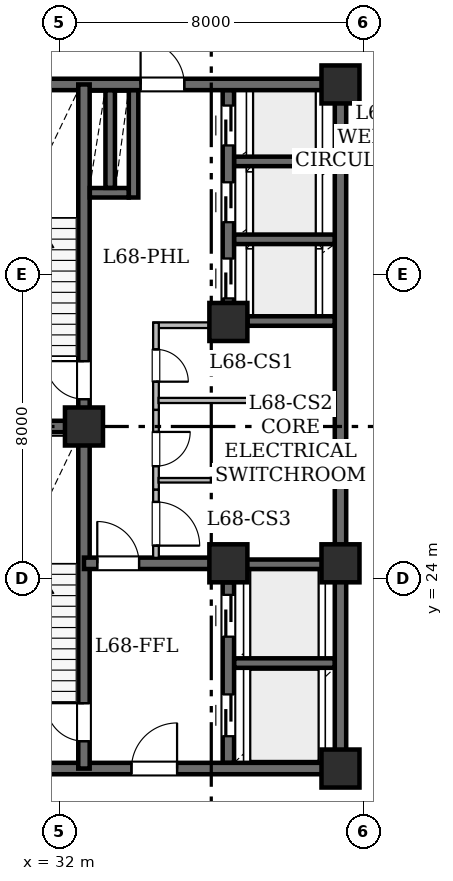
"""IFC4 building model, lengths in metres.
Left out: names, types, materials, properties, quantities, classifications, styles, units other than length and angle.
Written with IfcOpenShell. Run it as: python <this file> out.ifc"""

import sys

from ifc_helpers import new_model, si_unit, direction, frame, frame_2d, origin, origin_2d, place, context, subcontext, project, spatial, rectangle, hollow_rectangle, extrude, element, fill, save


model = new_model("IFC4")
c1 = context("Model", 3, precision=1e-05, world=origin(), true_north=direction((0.0, 1.0)))
c2 = subcontext(c1, "Body", "Model", "MODEL_VIEW")
j1 = project(units=[si_unit("LENGTHUNIT", "METRE"), si_unit("PLANEANGLEUNIT", "RADIAN")], contexts=[c1])
p1 = place(None, origin())
s1 = spatial("IfcSite", under=j1, at=p1, CompositionType="ELEMENT")
p2 = place(p1, origin())
s2 = spatial("IfcBuilding", under=s1, at=p2, CompositionType="ELEMENT")
p3 = place(p2, frame((0.0, 0.0, 264.65)))
s3 = spatial("IfcBuildingStorey", under=s2, at=p3, CompositionType="ELEMENT", Elevation=264.65)
for number, where, z_axis, x_axis in (
    (1, (32.65, 28.0, 0.0), (0.0, 0.0, 1.0), (1.0, 0.0, 0.0)),
    (2, (39.4, 19.0, 0.0), (0.0, 0.0, 1.0), (1.0, 0.0, 0.0)),
    (3, (36.45, 24.4, 0.0), (0.0, 0.0, 1.0), (1.0, 0.0, 0.0)),
    (4, (39.4, 24.4, 0.0), (0.0, 0.0, 1.0), (1.0, 0.0, 0.0)),
    (5, (36.45, 30.75, 0.0), (0.0, 0.0, 1.0), (1.0, 0.0, 0.0)),
    (6, (39.4, 37.0, 0.0), (0.0, 0.0, 1.0), (1.0, 0.0, 0.0)),
):
    element("IfcColumn", number, at=place(p3, frame(where, z_axis=z_axis, x_axis=x_axis)), inside=s3, PredefinedType="COLUMN", context=c2, shape_type="SweptSolid", body=[
        extrude(hollow_rectangle(XDim=1.0, YDim=1.0, WallThickness=0.05, at=origin_2d()), origin(), (0.0, 0.0, 1.0), 4.775),
    ])
p4 = place(p3, frame((29.0, 19.0, 0.0), z_axis=(0.0, 0.0, 1.0), x_axis=(1.0, 0.0, 0.0)))
e7 = element("IfcWall", 7, at=p4, inside=s3, PredefinedType="SHEAR", context=c2, shape_type="SweptSolid", body=[
    extrude(rectangle(XDim=10.4, YDim=0.3, at=frame_2d((5.2, 0.0))), origin(), (0.0, 0.0, 1.0), 4.38),
])
p5 = place(p4, frame((4.9, 0.0, 0.0)))
e8 = element("IfcOpeningElement", 8, at=p5, cuts=e7, PredefinedType="OPENING", context=c2, shape_type="SweptSolid", body=[
    extrude(rectangle(XDim=1.2, YDim=2.15, at=frame_2d((0.6, 1.075))), frame((0.0, 0.16, 0.0), z_axis=(0.0, -1.0, 0.0), x_axis=(1.0, 0.0, 0.0)), (0.0, 0.0, 1.0), 0.32),
])
p6 = place(p3, frame((29.0, 37.0, 0.0), z_axis=(0.0, 0.0, 1.0), x_axis=(1.0, 0.0, 0.0)))
e9 = element("IfcWall", 9, at=p6, inside=s3, PredefinedType="SHEAR", context=c2, shape_type="SweptSolid", body=[
    extrude(rectangle(XDim=10.4, YDim=0.3, at=frame_2d((5.2, 0.0))), origin(), (0.0, 0.0, 1.0), 4.38),
])
p7 = place(p6, frame((5.14, 0.0, 0.0)))
e10 = element("IfcOpeningElement", 10, at=p7, cuts=e9, PredefinedType="OPENING", context=c2, shape_type="SweptSolid", body=[
    extrude(rectangle(XDim=1.15, YDim=2.2, at=frame_2d((0.575, 1.1))), frame((0.0, 0.16, 0.0), z_axis=(0.0, -1.0, 0.0), x_axis=(1.0, 0.0, 0.0)), (0.0, 0.0, 1.0), 0.32),
])
p8 = place(p3, frame((39.4, 19.0, 0.0), z_axis=(0.0, 0.0, 1.0), x_axis=(0.0, 1.0, 0.0)))
e11 = element("IfcWall", 11, at=p8, inside=s3, PredefinedType="SHEAR", context=c2, shape_type="SweptSolid", body=[
    extrude(rectangle(XDim=5.4, YDim=0.3, at=frame_2d((2.7, 0.0))), origin(), (0.0, 0.0, 1.0), 4.38),
])
p9 = place(p3, frame((39.4, 24.4, 0.0), z_axis=(0.0, 0.0, 1.0), x_axis=(0.0, 1.0, 0.0)))
e12 = element("IfcWall", 12, at=p9, inside=s3, PredefinedType="SHEAR", context=c2, shape_type="SweptSolid", body=[
    extrude(rectangle(XDim=12.6, YDim=0.3, at=frame_2d((6.3, 0.0))), origin(), (0.0, 0.0, 1.0), 4.38),
])
p10 = place(p3, frame((32.65, 19.0, 0.0), z_axis=(0.0, 0.0, 1.0), x_axis=(0.0, 1.0, 0.0)))
e13 = element("IfcWall", 13, at=p10, inside=s3, PredefinedType="SHEAR", context=c2, shape_type="SweptSolid", body=[
    extrude(rectangle(XDim=9.0, YDim=0.3, at=frame_2d((4.5, 0.0))), origin(), (0.0, 0.0, 1.0), 4.38),
])
p11 = place(p10, frame((0.72, 0.0, 0.0)))
e14 = element("IfcOpeningElement", 14, at=p11, cuts=e13, PredefinedType="OPENING", context=c2, shape_type="SweptSolid", body=[
    extrude(rectangle(XDim=1.0, YDim=2.15, at=frame_2d((0.5, 1.075))), frame((0.0, 0.16, 0.0), z_axis=(0.0, -1.0, 0.0), x_axis=(1.0, 0.0, 0.0)), (0.0, 0.0, 1.0), 0.32),
])
p12 = place(p3, frame((32.65, 28.0, 0.0), z_axis=(0.0, 0.0, 1.0), x_axis=(0.0, 1.0, 0.0)))
e15 = element("IfcWall", 15, at=p12, inside=s3, PredefinedType="SHEAR", context=c2, shape_type="SweptSolid", body=[
    extrude(rectangle(XDim=9.0, YDim=0.3, at=frame_2d((4.5, 0.0))), origin(), (0.0, 0.0, 1.0), 4.38),
])
p13 = place(p12, frame((0.72, 0.0, 0.0)))
e16 = element("IfcOpeningElement", 16, at=p13, cuts=e15, PredefinedType="OPENING", context=c2, shape_type="SweptSolid", body=[
    extrude(rectangle(XDim=1.0, YDim=2.15, at=frame_2d((0.5, 1.075))), frame((0.0, 0.16, 0.0), z_axis=(0.0, -1.0, 0.0), x_axis=(1.0, 0.0, 0.0)), (0.0, 0.0, 1.0), 0.32),
])
p14 = place(p3, frame((29.0, 28.0, 0.0), z_axis=(0.0, 0.0, 1.0), x_axis=(1.0, 0.0, 0.0)))
e17 = element("IfcWall", 17, at=p14, inside=s3, PredefinedType="SHEAR", context=c2, shape_type="SweptSolid", body=[
    extrude(rectangle(XDim=3.65, YDim=0.3, at=frame_2d((1.825, 0.0))), origin(), (0.0, 0.0, 1.0), 4.38),
])
p15 = place(p3, frame((32.65, 24.4, 0.0), z_axis=(0.0, 0.0, 1.0), x_axis=(1.0, 0.0, 0.0)))
e18 = element("IfcWall", 18, at=p15, inside=s3, PredefinedType="SHEAR", context=c2, shape_type="SweptSolid", body=[
    extrude(rectangle(XDim=3.8, YDim=0.3, at=frame_2d((1.9, 0.0))), origin(), (0.0, 0.0, 1.0), 4.38),
])
p16 = place(p15, frame((0.35, 0.0, 0.0)))
e19 = element("IfcOpeningElement", 19, at=p16, cuts=e18, PredefinedType="OPENING", context=c2, shape_type="SweptSolid", body=[
    extrude(rectangle(XDim=1.1, YDim=2.15, at=frame_2d((0.55, 1.075))), frame((0.0, 0.16, 0.0), z_axis=(0.0, -1.0, 0.0), x_axis=(1.0, 0.0, 0.0)), (0.0, 0.0, 1.0), 0.32),
])
p17 = place(p3, frame((36.45, 19.154, 0.0), z_axis=(0.0, 0.0, 1.0), x_axis=(0.0, 1.0, 0.0)))
e20 = element("IfcWall", 20, at=p17, inside=s3, PredefinedType="SHEAR", context=c2, shape_type="SweptSolid", body=[
    extrude(rectangle(XDim=4.746, YDim=0.3, at=frame_2d((2.373, 0.0))), origin(), (0.0, 0.0, 1.0), 4.38),
])
p18 = place(p17, frame((0.696, 0.0, 0.0)))
e21 = element("IfcOpeningElement", 21, at=p18, cuts=e20, PredefinedType="OPENING", context=c2, shape_type="SweptSolid", body=[
    extrude(rectangle(XDim=1.1, YDim=2.15, at=frame_2d((0.55, 1.075))), frame((0.0, 0.16, 0.0), z_axis=(0.0, -1.0, 0.0), x_axis=(1.0, 0.0, 0.0)), (0.0, 0.0, 1.0), 0.32),
])
p19 = place(p17, frame((3.316, 0.0, 0.0)))
e22 = element("IfcOpeningElement", 22, at=p19, cuts=e20, PredefinedType="OPENING", context=c2, shape_type="SweptSolid", body=[
    extrude(rectangle(XDim=1.1, YDim=2.15, at=frame_2d((0.55, 1.075))), frame((0.0, 0.16, 0.0), z_axis=(0.0, -1.0, 0.0), x_axis=(1.0, 0.0, 0.0)), (0.0, 0.0, 1.0), 0.32),
])
p20 = place(p3, frame((36.45, 31.25, 0.0), z_axis=(0.0, 0.0, 1.0), x_axis=(0.0, 1.0, 0.0)))
e23 = element("IfcWall", 23, at=p20, inside=s3, PredefinedType="SHEAR", context=c2, shape_type="SweptSolid", body=[
    extrude(rectangle(XDim=5.596, YDim=0.3, at=frame_2d((2.798, 0.0))), origin(), (0.0, 0.0, 1.0), 4.38),
])
p21 = place(p20, frame((0.12, 0.0, 0.0)))
e24 = element("IfcOpeningElement", 24, at=p21, cuts=e23, PredefinedType="OPENING", context=c2, shape_type="SweptSolid", body=[
    extrude(rectangle(XDim=1.05, YDim=2.15, at=frame_2d((0.525, 1.075))), frame((0.0, 0.16, 0.0), z_axis=(0.0, -1.0, 0.0), x_axis=(1.0, 0.0, 0.0)), (0.0, 0.0, 1.0), 0.32),
])
p22 = place(p20, frame((2.125, 0.0, 0.0)))
e25 = element("IfcOpeningElement", 25, at=p22, cuts=e23, PredefinedType="OPENING", context=c2, shape_type="SweptSolid", body=[
    extrude(rectangle(XDim=1.05, YDim=2.15, at=frame_2d((0.525, 1.075))), frame((0.0, 0.16, 0.0), z_axis=(0.0, -1.0, 0.0), x_axis=(1.0, 0.0, 0.0)), (0.0, 0.0, 1.0), 0.32),
])
p23 = place(p20, frame((4.145, 0.0, 0.0)))
e26 = element("IfcOpeningElement", 26, at=p23, cuts=e23, PredefinedType="OPENING", context=c2, shape_type="SweptSolid", body=[
    extrude(rectangle(XDim=1.05, YDim=2.15, at=frame_2d((0.525, 1.075))), frame((0.0, 0.16, 0.0), z_axis=(0.0, -1.0, 0.0), x_axis=(1.0, 0.0, 0.0)), (0.0, 0.0, 1.0), 0.32),
])
for number, where, z_axis, x_axis in (
    (27, (36.604, 21.775, 0.0), (0.0, 0.0, 1.0), (1.0, 0.0, 0.0)),
    (28, (36.604, 24.375, 0.0), (0.0, 0.0, 1.0), (1.0, 0.0, 0.0)),
):
    element("IfcWall", number, at=place(p3, frame(where, z_axis=z_axis, x_axis=x_axis)), inside=s3, PredefinedType="SHEAR", context=c2, shape_type="SweptSolid", body=[
        extrude(rectangle(XDim=2.642, YDim=0.25, at=frame_2d((1.321, 0.0))), origin(), (0.0, 0.0, 1.0), 4.38),
    ])
p24 = place(p3, frame((36.954, 30.775, 0.0), z_axis=(0.0, 0.0, 1.0), x_axis=(1.0, 0.0, 0.0)))
e29 = element("IfcWall", 29, at=p24, inside=s3, PredefinedType="SHEAR", context=c2, shape_type="SweptSolid", body=[
    extrude(rectangle(XDim=2.292, YDim=0.25, at=frame_2d((1.146, 0.0))), origin(), (0.0, 0.0, 1.0), 4.38),
])
for number, where, z_axis, x_axis in (
    (30, (36.604, 32.925, 0.0), (0.0, 0.0, 1.0), (1.0, 0.0, 0.0)),
    (31, (36.604, 34.975, 0.0), (0.0, 0.0, 1.0), (1.0, 0.0, 0.0)),
):
    element("IfcWall", number, at=place(p3, frame(where, z_axis=z_axis, x_axis=x_axis)), inside=s3, PredefinedType="SHEAR", context=c2, shape_type="SweptSolid", body=[
        extrude(rectangle(XDim=2.642, YDim=0.25, at=frame_2d((1.321, 0.0))), origin(), (0.0, 0.0, 1.0), 4.38),
    ])
p25 = place(p3, frame((33.955, 34.025, 0.0), z_axis=(0.0, 0.0, 1.0), x_axis=(0.0, 1.0, 0.0)))
e32 = element("IfcWall", 32, at=p25, inside=s3, PredefinedType="SHEAR", context=c2, shape_type="SweptSolid", body=[
    extrude(rectangle(XDim=2.821, YDim=0.25, at=frame_2d((1.411, 0.0))), origin(), (0.0, 0.0, 1.0), 4.38),
])
p26 = place(p3, frame((32.804, 34.15, 0.0), z_axis=(0.0, 0.0, 1.0), x_axis=(1.0, 0.0, 0.0)))
e33 = element("IfcWall", 33, at=p26, inside=s3, PredefinedType="SHEAR", context=c2, shape_type="SweptSolid", body=[
    extrude(rectangle(XDim=1.022, YDim=0.25, at=frame_2d((0.511, 0.0))), origin(), (0.0, 0.0, 1.0), 4.38),
])
p27 = place(p3, frame((33.34, 34.279, 0.0), z_axis=(0.0, 0.0, 1.0), x_axis=(0.0, 1.0, 0.0)))
e34 = element("IfcWall", 34, at=p27, inside=s3, PredefinedType="SHEAR", context=c2, shape_type="SweptSolid", body=[
    extrude(rectangle(XDim=2.567, YDim=0.25, at=frame_2d((1.283, 0.0))), origin(), (0.0, 0.0, 1.0), 4.38),
])
p28 = place(p3, frame((36.3, 30.665, 0.0), z_axis=(0.0, 0.0, 1.0), x_axis=(-1.0, 0.0, 0.0)))
e35 = element("IfcWall", 35, at=p28, inside=s3, PredefinedType="STANDARD", context=c2, shape_type="SweptSolid", body=[
    extrude(rectangle(XDim=1.82, YDim=0.15, at=frame_2d((0.91, 0.0))), origin(), (0.0, 0.0, 1.0), 4.38),
])
p29 = place(p3, frame((34.545, 30.73, 0.0), z_axis=(0.0, 0.0, 1.0), x_axis=(0.0, -1.0, 0.0)))
e36 = element("IfcWall", 36, at=p29, inside=s3, PredefinedType="STANDARD", context=c2, shape_type="SweptSolid", body=[
    extrude(rectangle(XDim=2.294, YDim=0.15, at=frame_2d((1.147, 0.0))), origin(), (0.0, 0.0, 1.0), 4.38),
])
p30 = place(p29, frame((0.701, 0.0, 0.0)))
e37 = element("IfcOpeningElement", 37, at=p30, cuts=e36, PredefinedType="OPENING", context=c2, shape_type="SweptSolid", body=[
    extrude(rectangle(XDim=0.85, YDim=2.1, at=frame_2d((0.425, 1.05))), frame((0.0, 0.085, 0.0), z_axis=(0.0, -1.0, 0.0), x_axis=(1.0, 0.0, 0.0)), (0.0, 0.0, 1.0), 0.17),
])
p31 = place(p3, frame((34.545, 28.436, 0.0), z_axis=(0.0, 0.0, 1.0), x_axis=(0.0, -1.0, 0.0)))
e38 = element("IfcWall", 38, at=p31, inside=s3, PredefinedType="STANDARD", context=c2, shape_type="SweptSolid", body=[
    extrude(rectangle(XDim=2.1, YDim=0.15, at=frame_2d((1.05, 0.0))), origin(), (0.0, 0.0, 1.0), 4.38),
])
p32 = place(p31, frame((0.579, 0.0, 0.0)))
e39 = element("IfcOpeningElement", 39, at=p32, cuts=e38, PredefinedType="OPENING", context=c2, shape_type="SweptSolid", body=[
    extrude(rectangle(XDim=0.9, YDim=2.1, at=frame_2d((0.45, 1.05))), frame((0.0, 0.085, 0.0), z_axis=(0.0, -1.0, 0.0), x_axis=(1.0, 0.0, 0.0)), (0.0, 0.0, 1.0), 0.17),
])
p33 = place(p3, frame((34.545, 26.336, 0.0), z_axis=(0.0, 0.0, 1.0), x_axis=(0.0, -1.0, 0.0)))
e40 = element("IfcWall", 40, at=p33, inside=s3, PredefinedType="STANDARD", context=c2, shape_type="SweptSolid", body=[
    extrude(rectangle(XDim=1.792, YDim=0.15, at=frame_2d((0.896, 0.0))), origin(), (0.0, 0.0, 1.0), 4.38),
])
p34 = place(p33, frame((0.321, 0.0, 0.0)))
e41 = element("IfcOpeningElement", 41, at=p34, cuts=e40, PredefinedType="OPENING", context=c2, shape_type="SweptSolid", body=[
    extrude(rectangle(XDim=1.15, YDim=2.2, at=frame_2d((0.575, 1.1))), frame((0.0, 0.085, 0.0), z_axis=(0.0, -1.0, 0.0), x_axis=(1.0, 0.0, 0.0)), (0.0, 0.0, 1.0), 0.17),
])
p35 = place(p3, frame((39.256, 28.685, 0.0), z_axis=(0.0, 0.0, 1.0), x_axis=(-1.0, 0.0, 0.0)))
e42 = element("IfcWall", 42, at=p35, inside=s3, PredefinedType="PARTITIONING", context=c2, shape_type="SweptSolid", body=[
    extrude(rectangle(XDim=4.644, YDim=0.135, at=frame_2d((2.322, 0.0))), origin(), (0.0, 0.0, 1.0), 4.38),
])
p36 = place(p3, frame((39.256, 26.585, 0.0), z_axis=(0.0, 0.0, 1.0), x_axis=(-1.0, 0.0, 0.0)))
e43 = element("IfcWall", 43, at=p36, inside=s3, PredefinedType="PARTITIONING", context=c2, shape_type="SweptSolid", body=[
    extrude(rectangle(XDim=4.644, YDim=0.12, at=frame_2d((2.322, 0.0))), origin(), (0.0, 0.0, 1.0), 4.38),
])
p37 = place(p11, origin())
e44 = element("IfcDoor", 44, at=p37, inside=s3, OperationType="SINGLE_SWING_RIGHT", PredefinedType="DOOR", context=c2, shape_type="SweptSolid", body=[
    extrude(rectangle(XDim=1.0, YDim=2.15, at=frame_2d((0.5, 1.075))), frame((0.0, 0.025, 0.0), z_axis=(0.0, -1.0, 0.0), x_axis=(1.0, 0.0, 0.0)), (0.0, 0.0, 1.0), 0.05),
])
fill(e14, e44)
p38 = place(p13, origin())
e45 = element("IfcDoor", 45, at=p38, inside=s3, OperationType="SINGLE_SWING_RIGHT", PredefinedType="DOOR", context=c2, shape_type="SweptSolid", body=[
    extrude(rectangle(XDim=1.0, YDim=2.15, at=frame_2d((0.5, 1.075))), frame((0.0, 0.025, 0.0), z_axis=(0.0, -1.0, 0.0), x_axis=(1.0, 0.0, 0.0)), (0.0, 0.0, 1.0), 0.05),
])
fill(e16, e45)
p39 = place(p16, origin())
e46 = element("IfcDoor", 46, at=p39, inside=s3, OperationType="SINGLE_SWING_LEFT", PredefinedType="DOOR", context=c2, shape_type="SweptSolid", body=[
    extrude(rectangle(XDim=1.1, YDim=2.15, at=frame_2d((0.55, 1.075))), frame((0.0, 0.025, 0.0), z_axis=(0.0, -1.0, 0.0), x_axis=(1.0, 0.0, 0.0)), (0.0, 0.0, 1.0), 0.05),
])
fill(e19, e46)
p40 = place(p5, origin())
e47 = element("IfcDoor", 47, at=p40, inside=s3, OperationType="SINGLE_SWING_RIGHT", PredefinedType="DOOR", context=c2, shape_type="SweptSolid", body=[
    extrude(rectangle(XDim=1.2, YDim=2.15, at=frame_2d((0.6, 1.075))), frame((0.0, 0.025, 0.0), z_axis=(0.0, -1.0, 0.0), x_axis=(1.0, 0.0, 0.0)), (0.0, 0.0, 1.0), 0.05),
])
fill(e8, e47)
p41 = place(p7, origin())
e48 = element("IfcDoor", 48, at=p41, inside=s3, OperationType="SINGLE_SWING_LEFT", PredefinedType="DOOR", context=c2, shape_type="SweptSolid", body=[
    extrude(rectangle(XDim=1.15, YDim=2.2, at=frame_2d((0.575, 1.1))), frame((0.0, 0.025, 0.0), z_axis=(0.0, -1.0, 0.0), x_axis=(1.0, 0.0, 0.0)), (0.0, 0.0, 1.0), 0.05),
])
fill(e10, e48)
p42 = place(p18, origin())
e49 = element("IfcDoor", 49, at=p42, inside=s3, OperationType="SLIDING_TO_LEFT", PredefinedType="DOOR", context=c2, shape_type="SweptSolid", body=[
    extrude(rectangle(XDim=1.1, YDim=2.15, at=frame_2d((0.55, 1.075))), frame((0.0, 0.025, 0.0), z_axis=(0.0, -1.0, 0.0), x_axis=(1.0, 0.0, 0.0)), (0.0, 0.0, 1.0), 0.05),
])
fill(e21, e49)
p43 = place(p19, origin())
e50 = element("IfcDoor", 50, at=p43, inside=s3, OperationType="SLIDING_TO_LEFT", PredefinedType="DOOR", context=c2, shape_type="SweptSolid", body=[
    extrude(rectangle(XDim=1.1, YDim=2.15, at=frame_2d((0.55, 1.075))), frame((0.0, 0.025, 0.0), z_axis=(0.0, -1.0, 0.0), x_axis=(1.0, 0.0, 0.0)), (0.0, 0.0, 1.0), 0.05),
])
fill(e22, e50)
p44 = place(p21, origin())
e51 = element("IfcDoor", 51, at=p44, inside=s3, OperationType="SLIDING_TO_LEFT", PredefinedType="DOOR", context=c2, shape_type="SweptSolid", body=[
    extrude(rectangle(XDim=1.05, YDim=2.15, at=frame_2d((0.525, 1.075))), frame((0.0, 0.025, 0.0), z_axis=(0.0, -1.0, 0.0), x_axis=(1.0, 0.0, 0.0)), (0.0, 0.0, 1.0), 0.05),
])
fill(e24, e51)
p45 = place(p22, origin())
e52 = element("IfcDoor", 52, at=p45, inside=s3, OperationType="SLIDING_TO_LEFT", PredefinedType="DOOR", context=c2, shape_type="SweptSolid", body=[
    extrude(rectangle(XDim=1.05, YDim=2.15, at=frame_2d((0.525, 1.075))), frame((0.0, 0.025, 0.0), z_axis=(0.0, -1.0, 0.0), x_axis=(1.0, 0.0, 0.0)), (0.0, 0.0, 1.0), 0.05),
])
fill(e25, e52)
p46 = place(p23, origin())
e53 = element("IfcDoor", 53, at=p46, inside=s3, OperationType="SLIDING_TO_LEFT", PredefinedType="DOOR", context=c2, shape_type="SweptSolid", body=[
    extrude(rectangle(XDim=1.05, YDim=2.15, at=frame_2d((0.525, 1.075))), frame((0.0, 0.025, 0.0), z_axis=(0.0, -1.0, 0.0), x_axis=(1.0, 0.0, 0.0)), (0.0, 0.0, 1.0), 0.05),
])
fill(e26, e53)
p47 = place(p30, origin())
e54 = element("IfcDoor", 54, at=p47, inside=s3, OperationType="SINGLE_SWING_RIGHT", PredefinedType="DOOR", context=c2, shape_type="SweptSolid", body=[
    extrude(rectangle(XDim=0.85, YDim=2.1, at=frame_2d((0.425, 1.05))), frame((0.0, 0.025, 0.0), z_axis=(0.0, -1.0, 0.0), x_axis=(1.0, 0.0, 0.0)), (0.0, 0.0, 1.0), 0.05),
])
fill(e37, e54)
p48 = place(p32, origin())
e55 = element("IfcDoor", 55, at=p48, inside=s3, OperationType="SINGLE_SWING_LEFT", PredefinedType="DOOR", context=c2, shape_type="SweptSolid", body=[
    extrude(rectangle(XDim=0.9, YDim=2.1, at=frame_2d((0.45, 1.05))), frame((0.0, 0.025, 0.0), z_axis=(0.0, -1.0, 0.0), x_axis=(1.0, 0.0, 0.0)), (0.0, 0.0, 1.0), 0.05),
])
fill(e39, e55)
p49 = place(p34, origin())
e56 = element("IfcDoor", 56, at=p49, inside=s3, OperationType="SINGLE_SWING_RIGHT", PredefinedType="DOOR", context=c2, shape_type="SweptSolid", body=[
    extrude(rectangle(XDim=1.15, YDim=2.2, at=frame_2d((0.575, 1.1))), frame((0.0, 0.025, 0.0), z_axis=(0.0, -1.0, 0.0), x_axis=(1.0, 0.0, 0.0)), (0.0, 0.0, 1.0), 0.05),
])
fill(e41, e56)
save(model, sys.argv[1])
